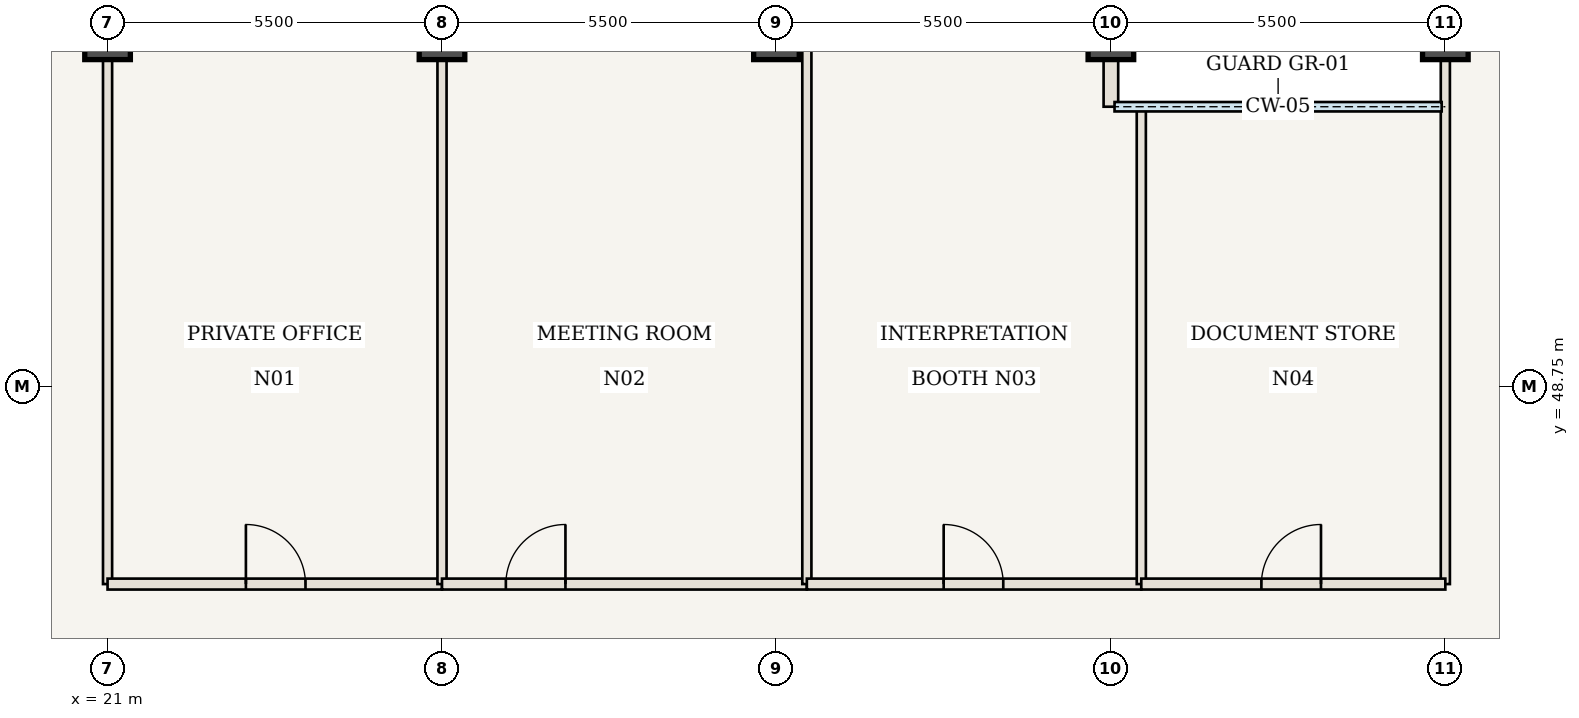
"""IFC4 building model, lengths in metres.
Left out: names, types, materials, properties, quantities, classifications, styles, units other than length and angle.
Written with IfcOpenShell. Run it as: python <this file> out.ifc"""

import sys

from ifc_helpers import new_model, si_unit, direction, frame, frame_2d, origin, origin_2d, place, context, subcontext, project, spatial, rectangle, extrude, element, fill, save


model = new_model("IFC4")
c1 = context("Model", 3, precision=1e-05, world=origin(), true_north=direction((0.0, 1.0)))
c2 = subcontext(c1, "Body", "Model", "MODEL_VIEW")
j1 = project(units=[si_unit("LENGTHUNIT", "METRE"), si_unit("PLANEANGLEUNIT", "RADIAN")], contexts=[c1])
p1 = place(None, origin())
s1 = spatial("IfcSite", under=j1, at=p1, CompositionType="ELEMENT")
p2 = place(p1, origin())
s2 = spatial("IfcBuilding", under=s1, at=p2, CompositionType="ELEMENT")
p3 = place(p2, frame((0.0, 0.0, 277.55)))
s3 = spatial("IfcBuildingStorey", under=s2, at=p3, CompositionType="ELEMENT", Elevation=277.55)
for number, where, z_axis, x_axis in (
    (1, (21.0, 54.5, 0.0), (0.0, 0.0, 1.0), (1.0, 0.0, 0.0)),
    (2, (26.5, 54.5, 0.0), (0.0, 0.0, 1.0), (1.0, 0.0, 0.0)),
    (3, (32.0, 54.5, 0.0), (0.0, 0.0, 1.0), (1.0, 0.0, 0.0)),
    (4, (37.5, 54.5, 0.0), (0.0, 0.0, 1.0), (1.0, 0.0, 0.0)),
    (5, (43.0, 54.5, 0.0), (0.0, 0.0, 1.0), (1.0, 0.0, 0.0)),
):
    element("IfcColumn", number, at=place(p3, frame(where, z_axis=z_axis, x_axis=x_axis)), inside=s3, PredefinedType="COLUMN", context=c2, shape_type="SweptSolid", body=[
        extrude(rectangle(XDim=0.75, YDim=0.75, at=origin_2d()), origin(), (0.0, 0.0, 1.0), 3.85),
    ])
for number, where, z_axis, x_axis in (
    (6, (21.0, 45.5, 0.0), (0.0, 0.0, 1.0), (0.0, 1.0, 0.0)),
    (7, (43.0, 45.5, 0.0), (0.0, 0.0, 1.0), (0.0, 1.0, 0.0)),
):
    element("IfcWall", number, at=place(p3, frame(where, z_axis=z_axis, x_axis=x_axis)), inside=s3, PredefinedType="STANDARD", context=c2, shape_type="SweptSolid", body=[
        extrude(rectangle(XDim=8.94, YDim=0.15, at=frame_2d((4.47, 0.0))), origin(), (0.0, 0.0, 1.0), 3.685),
    ])
p4 = place(p3, frame((21.0, 45.5, 0.0), z_axis=(0.0, 0.0, 1.0), x_axis=(1.0, 0.0, 0.0)))
e8 = element("IfcWall", 8, at=p4, inside=s3, PredefinedType="STANDARD", context=c2, shape_type="SweptSolid", body=[
    extrude(rectangle(XDim=5.5, YDim=0.18, at=frame_2d((2.75, 0.0))), origin(), (0.0, 0.0, 1.0), 3.685),
])
p5 = place(p4, frame((2.275, 0.0, 0.0)))
e9 = element("IfcOpeningElement", 9, at=p5, cuts=e8, PredefinedType="OPENING", context=c2, shape_type="SweptSolid", body=[
    extrude(rectangle(XDim=0.98, YDim=2.2, at=frame_2d((0.49, 1.1))), frame((0.0, 0.1, 0.0), z_axis=(0.0, -1.0, 0.0), x_axis=(1.0, 0.0, 0.0)), (0.0, 0.0, 1.0), 0.2),
])
p6 = place(p3, frame((26.5, 45.5, 0.0), z_axis=(0.0, 0.0, 1.0), x_axis=(0.0, 1.0, 0.0)))
e10 = element("IfcWall", 10, at=p6, inside=s3, PredefinedType="STANDARD", context=c2, shape_type="SweptSolid", body=[
    extrude(rectangle(XDim=8.94, YDim=0.15, at=frame_2d((4.47, 0.0))), origin(), (0.0, 0.0, 1.0), 3.685),
])
p7 = place(p3, frame((26.5, 45.5, 0.0), z_axis=(0.0, 0.0, 1.0), x_axis=(1.0, 0.0, 0.0)))
e11 = element("IfcWall", 11, at=p7, inside=s3, PredefinedType="STANDARD", context=c2, shape_type="SweptSolid", body=[
    extrude(rectangle(XDim=6.0, YDim=0.18, at=frame_2d((3.0, 0.0))), origin(), (0.0, 0.0, 1.0), 3.685),
])
p8 = place(p7, frame((1.05, 0.0, 0.0)))
e12 = element("IfcOpeningElement", 12, at=p8, cuts=e11, PredefinedType="OPENING", context=c2, shape_type="SweptSolid", body=[
    extrude(rectangle(XDim=0.98, YDim=2.2, at=frame_2d((0.49, 1.1))), frame((0.0, 0.1, 0.0), z_axis=(0.0, -1.0, 0.0), x_axis=(1.0, 0.0, 0.0)), (0.0, 0.0, 1.0), 0.2),
])
p9 = place(p3, frame((32.5, 45.5, 0.0), z_axis=(0.0, 0.0, 1.0), x_axis=(0.0, 1.0, 0.0)))
e13 = element("IfcWall", 13, at=p9, inside=s3, PredefinedType="STANDARD", context=c2, shape_type="SweptSolid", body=[
    extrude(rectangle(XDim=8.94, YDim=0.15, at=frame_2d((4.47, 0.0))), origin(), (0.0, 0.0, 1.0), 3.685),
])
p10 = place(p3, frame((32.5, 45.5, 0.0), z_axis=(0.0, 0.0, 1.0), x_axis=(1.0, 0.0, 0.0)))
e14 = element("IfcWall", 14, at=p10, inside=s3, PredefinedType="STANDARD", context=c2, shape_type="SweptSolid", body=[
    extrude(rectangle(XDim=5.5, YDim=0.18, at=frame_2d((2.75, 0.0))), origin(), (0.0, 0.0, 1.0), 3.685),
])
p11 = place(p10, frame((2.25, 0.0, 0.0)))
e15 = element("IfcOpeningElement", 15, at=p11, cuts=e14, PredefinedType="OPENING", context=c2, shape_type="SweptSolid", body=[
    extrude(rectangle(XDim=0.98, YDim=2.2, at=frame_2d((0.49, 1.1))), frame((0.0, 0.1, 0.0), z_axis=(0.0, -1.0, 0.0), x_axis=(1.0, 0.0, 0.0)), (0.0, 0.0, 1.0), 0.2),
])
p12 = place(p3, frame((38.0, 45.5, 0.0), z_axis=(0.0, 0.0, 1.0), x_axis=(0.0, 1.0, 0.0)))
e16 = element("IfcWall", 16, at=p12, inside=s3, PredefinedType="STANDARD", context=c2, shape_type="SweptSolid", body=[
    extrude(rectangle(XDim=7.84, YDim=0.15, at=frame_2d((3.92, 0.0))), origin(), (0.0, 0.0, 1.0), 3.685),
])
p13 = place(p3, frame((38.0, 45.5, 0.0), z_axis=(0.0, 0.0, 1.0), x_axis=(1.0, 0.0, 0.0)))
e17 = element("IfcWall", 17, at=p13, inside=s3, PredefinedType="STANDARD", context=c2, shape_type="SweptSolid", body=[
    extrude(rectangle(XDim=5.0, YDim=0.18, at=frame_2d((2.5, 0.0))), origin(), (0.0, 0.0, 1.0), 3.685),
])
p14 = place(p13, frame((1.975, 0.0, 0.0)))
e18 = element("IfcOpeningElement", 18, at=p14, cuts=e17, PredefinedType="OPENING", context=c2, shape_type="SweptSolid", body=[
    extrude(rectangle(XDim=0.98, YDim=2.2, at=frame_2d((0.49, 1.1))), frame((0.0, 0.1, 0.0), z_axis=(0.0, -1.0, 0.0), x_axis=(1.0, 0.0, 0.0)), (0.0, 0.0, 1.0), 0.2),
])
p15 = place(p3, frame((37.5, 54.5, 0.0), z_axis=(0.0, 0.0, 1.0), x_axis=(0.0, -1.0, 0.0)))
e19 = element("IfcWall", 19, at=p15, inside=s3, PredefinedType="USERDEFINED", context=c2, shape_type="SweptSolid", body=[
    extrude(rectangle(XDim=1.15, YDim=0.24, at=frame_2d((0.575, 0.0))), origin(), (0.0, 0.0, 1.0), 2.985),
])
p16 = place(p5, origin())
e20 = element("IfcDoor", 20, at=p16, inside=s3, OperationType="SINGLE_SWING_LEFT", PredefinedType="DOOR", context=c2, shape_type="SweptSolid", body=[
    extrude(rectangle(XDim=0.98, YDim=2.2, at=frame_2d((0.49, 1.1))), frame((0.0, 0.025, 0.0), z_axis=(0.0, -1.0, 0.0), x_axis=(1.0, 0.0, 0.0)), (0.0, 0.0, 1.0), 0.05),
])
fill(e9, e20)
p17 = place(p8, origin())
e21 = element("IfcDoor", 21, at=p17, inside=s3, OperationType="SINGLE_SWING_RIGHT", PredefinedType="DOOR", context=c2, shape_type="SweptSolid", body=[
    extrude(rectangle(XDim=0.98, YDim=2.2, at=frame_2d((0.49, 1.1))), frame((0.0, 0.025, 0.0), z_axis=(0.0, -1.0, 0.0), x_axis=(1.0, 0.0, 0.0)), (0.0, 0.0, 1.0), 0.05),
])
fill(e12, e21)
p18 = place(p11, origin())
e22 = element("IfcDoor", 22, at=p18, inside=s3, OperationType="SINGLE_SWING_LEFT", PredefinedType="DOOR", context=c2, shape_type="SweptSolid", body=[
    extrude(rectangle(XDim=0.98, YDim=2.2, at=frame_2d((0.49, 1.1))), frame((0.0, 0.025, 0.0), z_axis=(0.0, -1.0, 0.0), x_axis=(1.0, 0.0, 0.0)), (0.0, 0.0, 1.0), 0.05),
])
fill(e15, e22)
p19 = place(p14, origin())
e23 = element("IfcDoor", 23, at=p19, inside=s3, OperationType="SINGLE_SWING_RIGHT", PredefinedType="DOOR", context=c2, shape_type="SweptSolid", body=[
    extrude(rectangle(XDim=0.98, YDim=2.2, at=frame_2d((0.49, 1.1))), frame((0.0, 0.025, 0.0), z_axis=(0.0, -1.0, 0.0), x_axis=(1.0, 0.0, 0.0)), (0.0, 0.0, 1.0), 0.05),
])
fill(e18, e23)
save(model, sys.argv[1])
